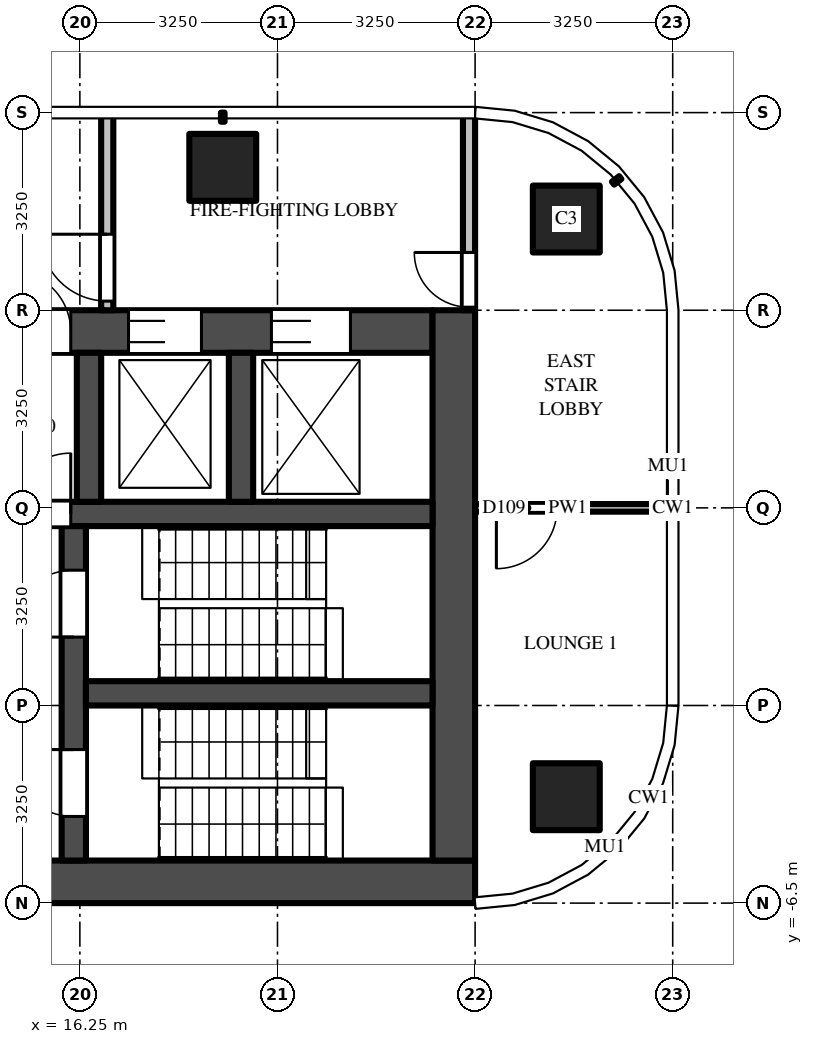
"""IFC4 building model, lengths in metres.
Left out: names, types, materials, properties, quantities, classifications, styles, units other than length and angle.
Written with IfcOpenShell. Run it as: python <this file> out.ifc"""

import sys

from ifc_helpers import new_model, si_unit, direction, frame, frame_2d, origin, origin_2d, place, context, subcontext, project, spatial, rectangle, extrude, source, transform, mapped, element, fill, save


model = new_model("IFC4")
c1 = context("Model", 3, precision=1e-05, world=origin(), true_north=direction((0.0, 1.0)))
c2 = subcontext(c1, "Body", "Model", "MODEL_VIEW")
j1 = project(units=[si_unit("LENGTHUNIT", "METRE"), si_unit("PLANEANGLEUNIT", "RADIAN")], contexts=[c1])
p1 = place(None, origin())
s1 = spatial("IfcSite", under=j1, at=p1, CompositionType="ELEMENT")
p2 = place(p1, origin())
s2 = spatial("IfcBuilding", under=s1, at=p2, CompositionType="ELEMENT")
p3 = place(p2, frame((0.0, 0.0, 224.6)))
s3 = spatial("IfcBuildingStorey", under=s2, at=p3, CompositionType="ELEMENT", Elevation=224.6)
m1 = source(origin(), c2, "Body", "SweptSolid", [
    extrude(rectangle(XDim=1.1, YDim=1.1, at=origin_2d()), origin(), (0.0, 0.0, 1.0), 3.9),
])
for number, where, z_axis, x_axis in (
    (1, (18.6, 5.6, 0.0), (0.0, 0.0, 1.0), (1.0, 0.0, 0.0)),
    (2, (24.25, 4.75, 0.0), (0.0, 0.0, 1.0), (1.0, 0.0, 0.0)),
    (3, (24.25, -4.75, 0.0), (0.0, 0.0, 1.0), (1.0, 0.0, 0.0)),
):
    element("IfcColumn", number, at=place(p3, frame(where, z_axis=z_axis, x_axis=x_axis)), inside=s3, PredefinedType="COLUMN", context=c2, shape_type="MappedRepresentation", body=[
        mapped(m1, transform((0.0, 0.0, 0.0))),
    ])
m2 = source(origin(), c2, "Body", "SweptSolid", [
    extrude(rectangle(XDim=16.6, YDim=0.7, at=frame_2d((8.3, 0.0))), origin(), (0.0, 0.0, 1.0), 3.7),
])
p4 = place(p3, frame((6.15, -6.15, 0.0), z_axis=(0.0, 0.0, 1.0), x_axis=(1.0, 0.0, 0.0)))
e4 = element("IfcWall", 4, at=p4, inside=s3, PredefinedType="SHEAR", context=c2, shape_type="MappedRepresentation", body=[
    mapped(m2, transform((0.0, 0.0, 0.0))),
])
m3 = source(origin(), c2, "Body", "SweptSolid", [
    extrude(rectangle(XDim=14.85, YDim=0.7, at=frame_2d((7.425, 0.0))), origin(), (0.0, 0.0, 1.0), 3.7),
])
p5 = place(p3, frame((7.2, 2.9, 0.0), z_axis=(0.0, 0.0, 1.0), x_axis=(1.0, 0.0, 0.0)))
e5 = element("IfcWall", 5, at=p5, inside=s3, PredefinedType="SHEAR", context=c2, shape_type="MappedRepresentation", body=[
    mapped(m3, transform((0.0, 0.0, 0.0))),
])
m4 = source(origin(), c2, "Body", "SweptSolid", [
    extrude(rectangle(XDim=1.1, YDim=2.1, at=frame_2d((0.55, 1.05))), frame((0.0, 0.36, 0.0), z_axis=(0.0, -1.0, 0.0), x_axis=(1.0, 0.0, 0.0)), (0.0, 0.0, 1.0), 0.72),
])
p6 = place(p5, frame((0.55, 0.0, 0.0)))
e6 = element("IfcOpeningElement", 6, at=p6, cuts=e5, PredefinedType="OPENING", context=c2, shape_type="MappedRepresentation", body=[
    mapped(m4, transform((0.0, 0.0, 0.0))),
])
p7 = place(p5, frame((3.15, 0.0, 0.0)))
e7 = element("IfcOpeningElement", 7, at=p7, cuts=e5, PredefinedType="OPENING", context=c2, shape_type="MappedRepresentation", body=[
    mapped(m4, transform((0.0, 0.0, 0.0))),
])
m5 = source(origin(), c2, "Body", "SweptSolid", [
    extrude(rectangle(XDim=1.2, YDim=2.1, at=frame_2d((0.6, 1.05))), frame((0.0, 0.36, 0.0), z_axis=(0.0, -1.0, 0.0), x_axis=(1.0, 0.0, 0.0)), (0.0, 0.0, 1.0), 0.72),
])
p8 = place(p5, frame((5.7, 0.0, 0.0)))
e8 = element("IfcOpeningElement", 8, at=p8, cuts=e5, PredefinedType="OPENING", context=c2, shape_type="MappedRepresentation", body=[
    mapped(m5, transform((0.0, 0.0, 0.0))),
])
m6 = source(origin(), c2, "Body", "SweptSolid", [
    extrude(rectangle(XDim=1.3, YDim=2.1, at=frame_2d((0.65, 1.05))), frame((0.0, 0.36, 0.0), z_axis=(0.0, -1.0, 0.0), x_axis=(1.0, 0.0, 0.0)), (0.0, 0.0, 1.0), 0.72),
])
p9 = place(p5, frame((12.2, 0.0, 0.0)))
e9 = element("IfcOpeningElement", 9, at=p9, cuts=e5, PredefinedType="OPENING", context=c2, shape_type="MappedRepresentation", body=[
    mapped(m6, transform((0.0, 0.0, 0.0))),
])
p10 = place(p5, frame((9.85, 0.0, 0.0)))
e10 = element("IfcOpeningElement", 10, at=p10, cuts=e5, PredefinedType="OPENING", context=c2, shape_type="MappedRepresentation", body=[
    mapped(m5, transform((0.0, 0.0, 0.0))),
])
m7 = source(origin(), c2, "Body", "SweptSolid", [
    extrude(rectangle(XDim=1.0, YDim=2.1, at=frame_2d((0.5, 1.05))), frame((0.0, 0.36, 0.0), z_axis=(0.0, -1.0, 0.0), x_axis=(1.0, 0.0, 0.0)), (0.0, 0.0, 1.0), 0.72),
])
p11 = place(p5, frame((7.9, 0.0, 0.0)))
e11 = element("IfcOpeningElement", 11, at=p11, cuts=e5, PredefinedType="OPENING", context=c2, shape_type="MappedRepresentation", body=[
    mapped(m7, transform((0.0, 0.0, 0.0))),
])
m8 = source(origin(), c2, "Body", "SweptSolid", [
    extrude(rectangle(XDim=9.05, YDim=0.7, at=frame_2d((4.525, 0.0))), origin(), (0.0, 0.0, 1.0), 3.7),
])
p12 = place(p3, frame((22.4, -5.8, 0.0), z_axis=(0.0, 0.0, 1.0), x_axis=(0.0, 1.0, 0.0)))
e12 = element("IfcWall", 12, at=p12, inside=s3, PredefinedType="SHEAR", context=c2, shape_type="MappedRepresentation", body=[
    mapped(m8, transform((0.0, 0.0, 0.0))),
])
m9 = source(origin(), c2, "Body", "SweptSolid", [
    extrude(rectangle(XDim=14.85, YDim=0.4, at=frame_2d((7.425, 0.0))), origin(), (0.0, 0.0, 1.0), 3.7),
])
p13 = place(p3, frame((7.2, -0.1, 0.0), z_axis=(0.0, 0.0, 1.0), x_axis=(1.0, 0.0, 0.0)))
e13 = element("IfcWall", 13, at=p13, inside=s3, PredefinedType="SHEAR", context=c2, shape_type="MappedRepresentation", body=[
    mapped(m9, transform((0.0, 0.0, 0.0))),
])
m10 = source(origin(), c2, "Body", "SweptSolid", [
    extrude(rectangle(XDim=1.0, YDim=2.1, at=frame_2d((0.5, 1.05))), frame((0.0, 0.21, 0.0), z_axis=(0.0, -1.0, 0.0), x_axis=(1.0, 0.0, 0.0)), (0.0, 0.0, 1.0), 0.42),
])
p14 = place(p13, frame((7.9, 0.0, 0.0)))
e14 = element("IfcOpeningElement", 14, at=p14, cuts=e13, PredefinedType="OPENING", context=c2, shape_type="MappedRepresentation", body=[
    mapped(m10, transform((0.0, 0.0, 0.0))),
])
m11 = source(origin(), c2, "Body", "SweptSolid", [
    extrude(rectangle(XDim=5.5, YDim=0.4, at=frame_2d((2.75, 0.0))), origin(), (0.0, 0.0, 1.0), 3.7),
])
p15 = place(p3, frame((16.15, -5.8, 0.0), z_axis=(0.0, 0.0, 1.0), x_axis=(0.0, 1.0, 0.0)))
e15 = element("IfcWall", 15, at=p15, inside=s3, PredefinedType="SHEAR", context=c2, shape_type="MappedRepresentation", body=[
    mapped(m11, transform((0.0, 0.0, 0.0))),
])
m12 = source(origin(), c2, "Body", "SweptSolid", [
    extrude(rectangle(XDim=1.1, YDim=2.1, at=frame_2d((0.55, 1.05))), frame((0.0, 0.21, 0.0), z_axis=(0.0, -1.0, 0.0), x_axis=(1.0, 0.0, 0.0)), (0.0, 0.0, 1.0), 0.42),
])
p16 = place(p15, frame((0.725, 0.0, 0.0)))
e16 = element("IfcOpeningElement", 16, at=p16, cuts=e15, PredefinedType="OPENING", context=c2, shape_type="MappedRepresentation", body=[
    mapped(m12, transform((0.0, 0.0, 0.0))),
])
p17 = place(p15, frame((3.675, 0.0, 0.0)))
e17 = element("IfcOpeningElement", 17, at=p17, cuts=e15, PredefinedType="OPENING", context=c2, shape_type="MappedRepresentation", body=[
    mapped(m12, transform((0.0, 0.0, 0.0))),
])
m13 = source(origin(), c2, "Body", "SweptSolid", [
    extrude(rectangle(XDim=5.7, YDim=0.4, at=frame_2d((2.85, 0.0))), origin(), (0.0, 0.0, 1.0), 3.7),
])
p18 = place(p3, frame((16.35, -3.05, 0.0), z_axis=(0.0, 0.0, 1.0), x_axis=(1.0, 0.0, 0.0)))
e18 = element("IfcWall", 18, at=p18, inside=s3, PredefinedType="SHEAR", context=c2, shape_type="MappedRepresentation", body=[
    mapped(m13, transform((0.0, 0.0, 0.0))),
])
m14 = source(origin(), c2, "Body", "SweptSolid", [
    extrude(rectangle(XDim=2.45, YDim=0.4, at=frame_2d((1.225, 0.0))), origin(), (0.0, 0.0, 1.0), 3.7),
])
for number, where, z_axis, x_axis in (
    (19, (16.4, 0.1, 0.0), (0.0, 0.0, 1.0), (0.0, 1.0, 0.0)),
    (20, (18.9, 0.1, 0.0), (0.0, 0.0, 1.0), (0.0, 1.0, 0.0)),
):
    element("IfcWall", number, at=place(p3, frame(where, z_axis=z_axis, x_axis=x_axis)), inside=s3, PredefinedType="SHEAR", context=c2, shape_type="MappedRepresentation", body=[
        mapped(m14, transform((0.0, 0.0, 0.0))),
    ])
m15 = source(origin(), c2, "Body", "SweptSolid", [
    extrude(rectangle(XDim=3.25, YDim=0.2, at=frame_2d((1.625, 0.0))), origin(), (0.0, 0.0, 1.0), 3.7),
])
p19 = place(p3, frame((16.7, 3.25, 0.0), z_axis=(0.0, 0.0, 1.0), x_axis=(0.0, 1.0, 0.0)))
e21 = element("IfcWall", 21, at=p19, inside=s3, PredefinedType="PARTITIONING", context=c2, shape_type="MappedRepresentation", body=[
    mapped(m15, transform((0.0, 0.0, 0.0))),
])
m16 = source(origin(), c2, "Body", "SweptSolid", [
    extrude(rectangle(XDim=1.1, YDim=2.1, at=frame_2d((0.55, 1.05))), frame((0.0, 0.11, 0.0), z_axis=(0.0, -1.0, 0.0), x_axis=(1.0, 0.0, 0.0)), (0.0, 0.0, 1.0), 0.22),
])
p20 = place(p19, frame((0.15, 0.0, 0.0)))
e22 = element("IfcOpeningElement", 22, at=p20, cuts=e21, PredefinedType="OPENING", context=c2, shape_type="MappedRepresentation", body=[
    mapped(m16, transform((0.0, 0.0, 0.0))),
])
p21 = place(p3, frame((22.65, 3.25, 0.0), z_axis=(0.0, 0.0, 1.0), x_axis=(0.0, 1.0, 0.0)))
e23 = element("IfcWall", 23, at=p21, inside=s3, PredefinedType="PARTITIONING", context=c2, shape_type="MappedRepresentation", body=[
    mapped(m15, transform((0.0, 0.0, 0.0))),
])
m17 = source(origin(), c2, "Body", "SweptSolid", [
    extrude(rectangle(XDim=0.9, YDim=2.1, at=frame_2d((0.45, 1.05))), frame((0.0, 0.11, 0.0), z_axis=(0.0, -1.0, 0.0), x_axis=(1.0, 0.0, 0.0)), (0.0, 0.0, 1.0), 0.22),
])
p22 = place(p21, frame((0.05, 0.0, 0.0)))
e24 = element("IfcOpeningElement", 24, at=p22, cuts=e23, PredefinedType="OPENING", context=c2, shape_type="MappedRepresentation", body=[
    mapped(m17, transform((0.0, 0.0, 0.0))),
])
m18 = source(origin(), c2, "Body", "SweptSolid", [
    extrude(rectangle(XDim=3.05, YDim=0.125, at=frame_2d((1.525, 0.0))), origin(), (0.0, 0.0, 1.0), 2.78),
])
p23 = place(p3, frame((25.8, 0.0, 0.0), z_axis=(0.0, 0.0, 1.0), x_axis=(-1.0, 0.0, 0.0)))
e25 = element("IfcWall", 25, at=p23, inside=s3, PredefinedType="PARTITIONING", context=c2, shape_type="MappedRepresentation", body=[
    mapped(m18, transform((0.0, 0.0, 0.0))),
])
m19 = source(origin(), c2, "Body", "SweptSolid", [
    extrude(rectangle(XDim=1.0, YDim=2.1, at=frame_2d((0.5, 1.05))), frame((0.0, 0.073, 0.0), z_axis=(0.0, -1.0, 0.0), x_axis=(1.0, 0.0, 0.0)), (0.0, 0.0, 1.0), 0.145),
])
p24 = place(p23, frame((1.7, 0.0, 0.0)))
e26 = element("IfcOpeningElement", 26, at=p24, cuts=e25, PredefinedType="OPENING", context=c2, shape_type="MappedRepresentation", body=[
    mapped(m19, transform((0.0, 0.0, 0.0))),
])
m20 = source(origin(), c2, "Body", "SweptSolid", [
    extrude(rectangle(XDim=1.3, YDim=2.1, at=frame_2d((0.65, 1.05))), frame((0.0, -0.275, 0.0), z_axis=(0.0, -1.0, 0.0), x_axis=(1.0, 0.0, 0.0)), (0.0, 0.0, 1.0), 0.05),
])
p25 = place(p9, origin())
e27 = element("IfcDoor", 27, at=p25, inside=s3, OperationType="DOUBLE_DOOR_SLIDING", PredefinedType="DOOR", context=c2, shape_type="MappedRepresentation", body=[
    mapped(m20, transform((0.0, 0.0, 0.0))),
])
fill(e9, e27)
m21 = source(origin(), c2, "Body", "SweptSolid", [
    extrude(rectangle(XDim=1.2, YDim=2.1, at=frame_2d((0.6, 1.05))), frame((0.0, -0.275, 0.0), z_axis=(0.0, -1.0, 0.0), x_axis=(1.0, 0.0, 0.0)), (0.0, 0.0, 1.0), 0.05),
])
p26 = place(p10, origin())
e28 = element("IfcDoor", 28, at=p26, inside=s3, OperationType="DOUBLE_DOOR_SLIDING", PredefinedType="DOOR", context=c2, shape_type="MappedRepresentation", body=[
    mapped(m21, transform((0.0, 0.0, 0.0))),
])
fill(e10, e28)
m22 = source(origin(), c2, "Body", "SweptSolid", [
    extrude(rectangle(XDim=1.1, YDim=2.1, at=frame_2d((0.55, 1.05))), frame((0.0, 0.025, 0.0), z_axis=(0.0, -1.0, 0.0), x_axis=(1.0, 0.0, 0.0)), (0.0, 0.0, 1.0), 0.05),
])
p27 = place(p16, origin())
e29 = element("IfcDoor", 29, at=p27, inside=s3, OperationType="SINGLE_SWING_RIGHT", PredefinedType="DOOR", context=c2, shape_type="MappedRepresentation", body=[
    mapped(m22, transform((0.0, 0.0, 0.0))),
])
fill(e16, e29)
p28 = place(p17, origin())
e30 = element("IfcDoor", 30, at=p28, inside=s3, OperationType="SINGLE_SWING_LEFT", PredefinedType="DOOR", context=c2, shape_type="MappedRepresentation", body=[
    mapped(m22, transform((0.0, 0.0, 0.0))),
])
fill(e17, e30)
m23 = source(origin(), c2, "Body", "SweptSolid", [
    extrude(rectangle(XDim=1.0, YDim=2.1, at=frame_2d((0.5, 1.05))), frame((0.0, 0.025, 0.0), z_axis=(0.0, -1.0, 0.0), x_axis=(1.0, 0.0, 0.0)), (0.0, 0.0, 1.0), 0.05),
])
p29 = place(p14, origin())
e31 = element("IfcDoor", 31, at=p29, inside=s3, OperationType="SINGLE_SWING_RIGHT", PredefinedType="DOOR", context=c2, shape_type="MappedRepresentation", body=[
    mapped(m23, transform((0.0, 0.0, 0.0))),
])
fill(e14, e31)
m24 = source(origin(), c2, "Body", "SweptSolid", [
    extrude(rectangle(XDim=1.0, YDim=2.1, at=frame_2d((0.5, 1.05))), frame((0.0, -0.275, 0.0), z_axis=(0.0, -1.0, 0.0), x_axis=(1.0, 0.0, 0.0)), (0.0, 0.0, 1.0), 0.05),
])
p30 = place(p11, origin())
e32 = element("IfcDoor", 32, at=p30, inside=s3, OperationType="SINGLE_SWING_LEFT", PredefinedType="DOOR", context=c2, shape_type="MappedRepresentation", body=[
    mapped(m24, transform((0.0, 0.0, 0.0))),
])
fill(e11, e32)
p31 = place(p20, origin())
e33 = element("IfcDoor", 33, at=p31, inside=s3, OperationType="SINGLE_SWING_RIGHT", PredefinedType="DOOR", context=c2, shape_type="MappedRepresentation", body=[
    mapped(m22, transform((0.0, 0.0, 0.0))),
])
fill(e22, e33)
m25 = source(origin(), c2, "Body", "SweptSolid", [
    extrude(rectangle(XDim=0.9, YDim=2.1, at=frame_2d((0.45, 1.05))), frame((0.0, 0.025, 0.0), z_axis=(0.0, -1.0, 0.0), x_axis=(1.0, 0.0, 0.0)), (0.0, 0.0, 1.0), 0.05),
])
p32 = place(p22, origin())
e34 = element("IfcDoor", 34, at=p32, inside=s3, OperationType="SINGLE_SWING_RIGHT", PredefinedType="DOOR", context=c2, shape_type="MappedRepresentation", body=[
    mapped(m25, transform((0.0, 0.0, 0.0))),
])
fill(e24, e34)
p33 = place(p24, origin())
e35 = element("IfcDoor", 35, at=p33, inside=s3, OperationType="SINGLE_SWING_RIGHT", PredefinedType="DOOR", context=c2, shape_type="MappedRepresentation", body=[
    mapped(m23, transform((0.0, 0.0, 0.0))),
])
fill(e26, e35)
save(model, sys.argv[1])
